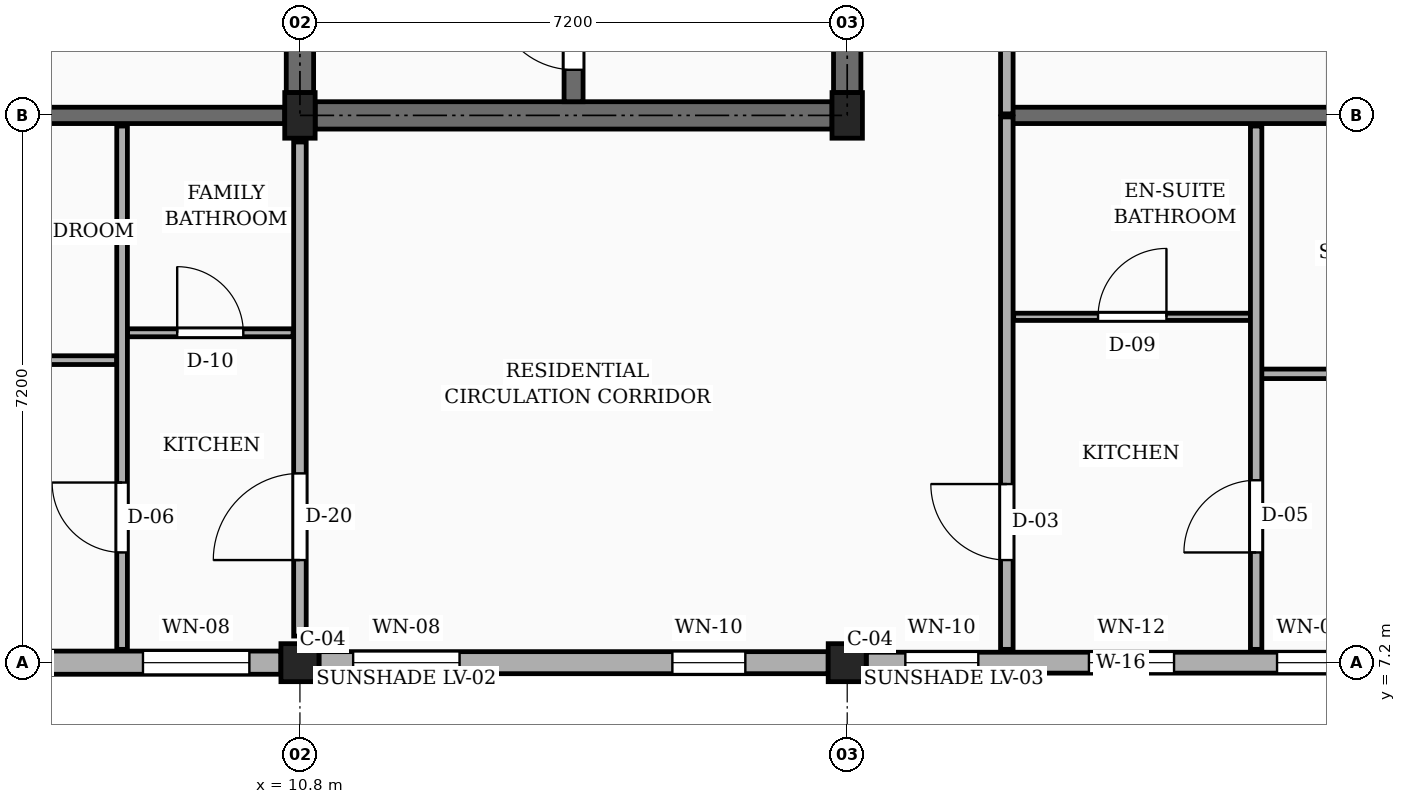
"""IFC4 building model, lengths in metres.
Left out: names, types, materials, properties, quantities, classifications, styles, units other than length and angle.
Written with IfcOpenShell. Run it as: python <this file> out.ifc"""

import sys

from ifc_helpers import new_model, si_unit, direction, frame, frame_2d, origin, origin_2d, place, context, subcontext, project, spatial, rectangle, extrude, element, fill, save


model = new_model("IFC4")
c1 = context("Model", 3, precision=1e-05, world=origin(), true_north=direction((0.0, 1.0)))
c2 = subcontext(c1, "Body", "Model", "MODEL_VIEW")
j1 = project(units=[si_unit("LENGTHUNIT", "METRE"), si_unit("PLANEANGLEUNIT", "RADIAN")], contexts=[c1])
p1 = place(None, origin())
s1 = spatial("IfcSite", under=j1, at=p1, CompositionType="ELEMENT")
p2 = place(p1, origin())
s2 = spatial("IfcBuilding", under=s1, at=p2, CompositionType="ELEMENT")
p3 = place(p2, frame((0.0, 0.0, 29.7)))
s3 = spatial("IfcBuildingStorey", under=s2, at=p3, CompositionType="ELEMENT", Elevation=29.7)
p4 = place(p3, frame((10.8, 7.2, 0.0), z_axis=(0.0, 0.0, 1.0), x_axis=(1.0, 0.0, 0.0)))
e1 = element("IfcColumn", 1, at=p4, inside=s3, PredefinedType="COLUMN", context=c2, shape_type="SweptSolid", body=[
    extrude(rectangle(XDim=0.5, YDim=0.5, at=origin_2d()), origin(), (0.0, 0.0, 1.0), 3.15),
])
p5 = place(p3, frame((10.8, 14.4, 0.0), z_axis=(0.0, 0.0, 1.0), x_axis=(1.0, 0.0, 0.0)))
e2 = element("IfcColumn", 2, at=p5, inside=s3, PredefinedType="COLUMN", context=c2, shape_type="SweptSolid", body=[
    extrude(rectangle(XDim=0.4, YDim=0.6, at=origin_2d()), origin(), (0.0, 0.0, 1.0), 3.15),
])
p6 = place(p3, frame((18.0, 7.2, 0.0), z_axis=(0.0, 0.0, 1.0), x_axis=(1.0, 0.0, 0.0)))
e3 = element("IfcColumn", 3, at=p6, inside=s3, PredefinedType="COLUMN", context=c2, shape_type="SweptSolid", body=[
    extrude(rectangle(XDim=0.5, YDim=0.5, at=origin_2d()), origin(), (0.0, 0.0, 1.0), 3.15),
])
p7 = place(p3, frame((18.0, 14.4, 0.0), z_axis=(0.0, 0.0, 1.0), x_axis=(1.0, 0.0, 0.0)))
e4 = element("IfcColumn", 4, at=p7, inside=s3, PredefinedType="COLUMN", context=c2, shape_type="SweptSolid", body=[
    extrude(rectangle(XDim=0.4, YDim=0.6, at=origin_2d()), origin(), (0.0, 0.0, 1.0), 3.15),
])
p8 = place(p3, frame((3.85, 14.4, 0.0), z_axis=(0.0, 0.0, 1.0), x_axis=(1.0, 0.0, 0.0)))
e5 = element("IfcWall", 5, at=p8, inside=s3, PredefinedType="SOLIDWALL", context=c2, shape_type="SweptSolid", body=[
    extrude(rectangle(XDim=6.75, YDim=0.215, at=frame_2d((3.375, 0.0))), origin(), (0.0, 0.0, 1.0), 2.17),
])
p9 = place(p8, frame((1.35, 0.0, 0.0)))
e6 = element("IfcOpeningElement", 6, at=p9, cuts=e5, PredefinedType="OPENING", context=c2, shape_type="SweptSolid", body=[
    extrude(rectangle(XDim=0.98, YDim=2.12, at=frame_2d((0.49, 1.06))), frame((0.0, 0.118, 0.0), z_axis=(0.0, -1.0, 0.0), x_axis=(1.0, 0.0, 0.0)), (0.0, 0.0, 1.0), 0.235),
])
p10 = place(p3, frame((20.1, 14.4, 0.0), z_axis=(0.0, 0.0, 1.0), x_axis=(1.0, 0.0, 0.0)))
e7 = element("IfcWall", 7, at=p10, inside=s3, PredefinedType="SOLIDWALL", context=c2, shape_type="SweptSolid", body=[
    extrude(rectangle(XDim=12.05, YDim=0.215, at=frame_2d((6.025, 0.0))), origin(), (0.0, 0.0, 1.0), 2.17),
])
p11 = place(p3, frame((3.85, 7.2, 0.0), z_axis=(0.0, 0.0, 1.0), x_axis=(1.0, 0.0, 0.0)))
e8 = element("IfcWall", 8, at=p11, inside=s3, PredefinedType="SOLIDWALL", context=c2, shape_type="SweptSolid", body=[
    extrude(rectangle(XDim=6.7, YDim=0.305, at=frame_2d((3.35, 0.0))), origin(), (0.0, 0.0, 1.0), 2.44),
])
p12 = place(p11, frame((1.755, 0.0, 0.78)))
e9 = element("IfcOpeningElement", 9, at=p12, cuts=e8, PredefinedType="OPENING", context=c2, shape_type="SweptSolid", body=[
    extrude(rectangle(XDim=1.24, YDim=1.15, at=frame_2d((0.62, 0.575))), frame((0.0, 0.163, 0.0), z_axis=(0.0, -1.0, 0.0), x_axis=(1.0, 0.0, 0.0)), (0.0, 0.0, 1.0), 0.325),
])
p13 = place(p11, frame((4.885, 0.0, 0.78)))
e10 = element("IfcOpeningElement", 10, at=p13, cuts=e8, PredefinedType="OPENING", context=c2, shape_type="SweptSolid", body=[
    extrude(rectangle(XDim=1.4, YDim=1.15, at=frame_2d((0.7, 0.575))), frame((0.0, 0.163, 0.0), z_axis=(0.0, -1.0, 0.0), x_axis=(1.0, 0.0, 0.0)), (0.0, 0.0, 1.0), 0.325),
])
p14 = place(p3, frame((11.05, 7.2, 0.0), z_axis=(0.0, 0.0, 1.0), x_axis=(1.0, 0.0, 0.0)))
e11 = element("IfcWall", 11, at=p14, inside=s3, PredefinedType="SOLIDWALL", context=c2, shape_type="SweptSolid", body=[
    extrude(rectangle(XDim=6.7, YDim=0.29, at=frame_2d((3.35, 0.0))), origin(), (0.0, 0.0, 1.0), 2.44),
])
p15 = place(p14, frame((0.45, 0.0, 0.78)))
e12 = element("IfcOpeningElement", 12, at=p15, cuts=e11, PredefinedType="OPENING", context=c2, shape_type="SweptSolid", body=[
    extrude(rectangle(XDim=1.4, YDim=1.15, at=frame_2d((0.7, 0.575))), frame((0.0, 0.155, 0.0), z_axis=(0.0, -1.0, 0.0), x_axis=(1.0, 0.0, 0.0)), (0.0, 0.0, 1.0), 0.31),
])
p16 = place(p14, frame((4.65, 0.0, 0.78)))
e13 = element("IfcOpeningElement", 13, at=p16, cuts=e11, PredefinedType="OPENING", context=c2, shape_type="SweptSolid", body=[
    extrude(rectangle(XDim=0.96, YDim=1.26, at=frame_2d((0.48, 0.63))), frame((0.0, 0.155, 0.0), z_axis=(0.0, -1.0, 0.0), x_axis=(1.0, 0.0, 0.0)), (0.0, 0.0, 1.0), 0.31),
])
p17 = place(p3, frame((18.25, 7.2, 0.0), z_axis=(0.0, 0.0, 1.0), x_axis=(1.0, 0.0, 0.0)))
e14 = element("IfcWall", 14, at=p17, inside=s3, PredefinedType="SOLIDWALL", context=c2, shape_type="SweptSolid", body=[
    extrude(rectangle(XDim=6.7, YDim=0.275, at=frame_2d((3.35, 0.0))), origin(), (0.0, 0.0, 1.0), 2.44),
])
p18 = place(p17, frame((0.515, 0.0, 0.78)))
e15 = element("IfcOpeningElement", 15, at=p18, cuts=e14, PredefinedType="OPENING", context=c2, shape_type="SweptSolid", body=[
    extrude(rectangle(XDim=0.96, YDim=1.26, at=frame_2d((0.48, 0.63))), frame((0.0, 0.147, 0.0), z_axis=(0.0, -1.0, 0.0), x_axis=(1.0, 0.0, 0.0)), (0.0, 0.0, 1.0), 0.295),
])
p19 = place(p17, frame((2.93, 0.0, 0.78)))
e16 = element("IfcOpeningElement", 16, at=p19, cuts=e14, PredefinedType="OPENING", context=c2, shape_type="SweptSolid", body=[
    extrude(rectangle(XDim=1.12, YDim=1.26, at=frame_2d((0.56, 0.63))), frame((0.0, 0.147, 0.0), z_axis=(0.0, -1.0, 0.0), x_axis=(1.0, 0.0, 0.0)), (0.0, 0.0, 1.0), 0.295),
])
p20 = place(p17, frame((5.405, 0.0, 0.78)))
e17 = element("IfcOpeningElement", 17, at=p20, cuts=e14, PredefinedType="OPENING", context=c2, shape_type="SweptSolid", body=[
    extrude(rectangle(XDim=0.88, YDim=1.26, at=frame_2d((0.44, 0.63))), frame((0.0, 0.147, 0.0), z_axis=(0.0, -1.0, 0.0), x_axis=(1.0, 0.0, 0.0)), (0.0, 0.0, 1.0), 0.295),
])
p21 = place(p3, frame((10.8, 14.7, 0.0), z_axis=(0.0, 0.0, 1.0), x_axis=(0.0, 1.0, 0.0)))
e18 = element("IfcWall", 18, at=p21, inside=s3, PredefinedType="SHEAR", context=c2, shape_type="SweptSolid", body=[
    extrude(rectangle(XDim=6.6, YDim=0.36, at=frame_2d((3.3, 0.0))), origin(), (0.0, 0.0, 1.0), 2.87),
])
p22 = place(p3, frame((18.0, 14.7, 0.0), z_axis=(0.0, 0.0, 1.0), x_axis=(0.0, 1.0, 0.0)))
e19 = element("IfcWall", 19, at=p22, inside=s3, PredefinedType="SHEAR", context=c2, shape_type="SweptSolid", body=[
    extrude(rectangle(XDim=6.6, YDim=0.36, at=frame_2d((3.3, 0.0))), origin(), (0.0, 0.0, 1.0), 2.87),
])
p23 = place(p22, frame((1.5, 0.0, 0.0)))
e20 = element("IfcOpeningElement", 20, at=p23, cuts=e19, PredefinedType="OPENING", context=c2, shape_type="SweptSolid", body=[
    extrude(rectangle(XDim=1.1, YDim=2.15, at=frame_2d((0.55, 1.075))), frame((0.0, 0.19, 0.0), z_axis=(0.0, -1.0, 0.0), x_axis=(1.0, 0.0, 0.0)), (0.0, 0.0, 1.0), 0.38),
])
p24 = place(p3, frame((11.0, 14.4, 0.0), z_axis=(0.0, 0.0, 1.0), x_axis=(1.0, 0.0, 0.0)))
e21 = element("IfcWall", 21, at=p24, inside=s3, PredefinedType="SHEAR", context=c2, shape_type="SweptSolid", body=[
    extrude(rectangle(XDim=6.8, YDim=0.36, at=frame_2d((3.4, 0.0))), origin(), (0.0, 0.0, 1.0), 2.87),
])
p25 = place(p3, frame((14.4, 14.58, 0.0), z_axis=(0.0, 0.0, 1.0), x_axis=(0.0, 1.0, 0.0)))
e22 = element("IfcWall", 22, at=p25, inside=s3, PredefinedType="SHEAR", context=c2, shape_type="SweptSolid", body=[
    extrude(rectangle(XDim=6.84, YDim=0.25, at=frame_2d((3.42, 0.0))), origin(), (0.0, 0.0, 1.0), 2.87),
])
p26 = place(p25, frame((0.42, 0.0, 0.0)))
e23 = element("IfcOpeningElement", 23, at=p26, cuts=e22, PredefinedType="OPENING", context=c2, shape_type="SweptSolid", body=[
    extrude(rectangle(XDim=1.05, YDim=2.15, at=frame_2d((0.525, 1.075))), frame((0.0, 0.135, 0.0), z_axis=(0.0, -1.0, 0.0), x_axis=(1.0, 0.0, 0.0)), (0.0, 0.0, 1.0), 0.27),
])
p27 = place(p3, frame((20.1, 7.375, 0.0), z_axis=(0.0, 0.0, 1.0), x_axis=(0.0, 1.0, 0.0)))
e24 = element("IfcWall", 24, at=p27, inside=s3, PredefinedType="PARTITIONING", context=c2, shape_type="SweptSolid", body=[
    extrude(rectangle(XDim=7.005, YDim=0.165, at=frame_2d((3.502, 0.0))), origin(), (0.0, 0.0, 1.0), 2.305),
])
p28 = place(p27, frame((1.175, 0.0, 0.0)))
e25 = element("IfcOpeningElement", 25, at=p28, cuts=e24, PredefinedType="OPENING", context=c2, shape_type="SweptSolid", body=[
    extrude(rectangle(XDim=1.0, YDim=2.15, at=frame_2d((0.5, 1.075))), frame((0.0, 0.093, 0.0), z_axis=(0.0, -1.0, 0.0), x_axis=(1.0, 0.0, 0.0)), (0.0, 0.0, 1.0), 0.185),
])
p29 = place(p3, frame((20.1, 14.42, 0.0), z_axis=(0.0, 0.0, 1.0), x_axis=(0.0, 1.0, 0.0)))
e26 = element("IfcWall", 26, at=p29, inside=s3, PredefinedType="PARTITIONING", context=c2, shape_type="SweptSolid", body=[
    extrude(rectangle(XDim=7.16, YDim=0.165, at=frame_2d((3.58, 0.0))), origin(), (0.0, 0.0, 1.0), 2.305),
])
p30 = place(p29, frame((4.78, 0.0, 0.0)))
e27 = element("IfcOpeningElement", 27, at=p30, cuts=e26, PredefinedType="OPENING", context=c2, shape_type="SweptSolid", body=[
    extrude(rectangle(XDim=0.94, YDim=2.12, at=frame_2d((0.47, 1.06))), frame((0.0, 0.093, 0.0), z_axis=(0.0, -1.0, 0.0), x_axis=(1.0, 0.0, 0.0)), (0.0, 0.0, 1.0), 0.185),
])
p31 = place(p3, frame((10.8, 7.55, 0.0), z_axis=(0.0, 0.0, 1.0), x_axis=(0.0, 1.0, 0.0)))
e28 = element("IfcWall", 28, at=p31, inside=s3, PredefinedType="PARTITIONING", context=c2, shape_type="SweptSolid", body=[
    extrude(rectangle(XDim=6.5, YDim=0.165, at=frame_2d((3.25, 0.0))), origin(), (0.0, 0.0, 1.0), 2.305),
])
p32 = place(p31, frame((1.0, 0.0, 0.0)))
e29 = element("IfcOpeningElement", 29, at=p32, cuts=e28, PredefinedType="OPENING", context=c2, shape_type="SweptSolid", body=[
    extrude(rectangle(XDim=1.14, YDim=2.18, at=frame_2d((0.57, 1.09))), frame((0.0, 0.093, 0.0), z_axis=(0.0, -1.0, 0.0), x_axis=(1.0, 0.0, 0.0)), (0.0, 0.0, 1.0), 0.185),
])
p33 = place(p3, frame((3.775, 11.18, 0.0), z_axis=(0.0, 0.0, 1.0), x_axis=(1.0, 0.0, 0.0)))
e30 = element("IfcWall", 30, at=p33, inside=s3, PredefinedType="PARTITIONING", context=c2, shape_type="SweptSolid", body=[
    extrude(rectangle(XDim=4.615, YDim=0.115, at=frame_2d((2.308, 0.0))), origin(), (0.0, 0.0, 1.0), 2.305),
])
p34 = place(p33, frame((1.867, 0.0, 0.0)))
e31 = element("IfcOpeningElement", 31, at=p34, cuts=e30, PredefinedType="OPENING", context=c2, shape_type="SweptSolid", body=[
    extrude(rectangle(XDim=0.88, YDim=2.08, at=frame_2d((0.44, 1.04))), frame((0.0, 0.067, 0.0), z_axis=(0.0, -1.0, 0.0), x_axis=(1.0, 0.0, 0.0)), (0.0, 0.0, 1.0), 0.135),
])
p35 = place(p3, frame((8.53, 11.54, 0.0), z_axis=(0.0, 0.0, 1.0), x_axis=(1.0, 0.0, 0.0)))
e32 = element("IfcWall", 32, at=p35, inside=s3, PredefinedType="PARTITIONING", context=c2, shape_type="SweptSolid", body=[
    extrude(rectangle(XDim=2.18, YDim=0.105, at=frame_2d((1.09, 0.0))), origin(), (0.0, 0.0, 1.0), 2.305),
])
p36 = place(p35, frame((0.655, 0.0, 0.0)))
e33 = element("IfcOpeningElement", 33, at=p36, cuts=e32, PredefinedType="OPENING", context=c2, shape_type="SweptSolid", body=[
    extrude(rectangle(XDim=0.87, YDim=2.05, at=frame_2d((0.435, 1.025))), frame((0.0, 0.062, 0.0), z_axis=(0.0, -1.0, 0.0), x_axis=(1.0, 0.0, 0.0)), (0.0, 0.0, 1.0), 0.125),
])
p37 = place(p3, frame((8.46, 7.375, 0.0), z_axis=(0.0, 0.0, 1.0), x_axis=(0.0, 1.0, 0.0)))
e34 = element("IfcWall", 34, at=p37, inside=s3, PredefinedType="PARTITIONING", context=c2, shape_type="SweptSolid", body=[
    extrude(rectangle(XDim=6.885, YDim=0.14, at=frame_2d((3.442, 0.0))), origin(), (0.0, 0.0, 1.0), 2.305),
])
p38 = place(p37, frame((1.275, 0.0, 0.0)))
e35 = element("IfcOpeningElement", 35, at=p38, cuts=e34, PredefinedType="OPENING", context=c2, shape_type="SweptSolid", body=[
    extrude(rectangle(XDim=0.92, YDim=2.1, at=frame_2d((0.46, 1.05))), frame((0.0, 0.08, 0.0), z_axis=(0.0, -1.0, 0.0), x_axis=(1.0, 0.0, 0.0)), (0.0, 0.0, 1.0), 0.16),
])
p39 = place(p3, frame((23.45, 11.0, 0.0), z_axis=(0.0, 0.0, 1.0), x_axis=(1.0, 0.0, 0.0)))
e36 = element("IfcWall", 36, at=p39, inside=s3, PredefinedType="PARTITIONING", context=c2, shape_type="SweptSolid", body=[
    extrude(rectangle(XDim=8.775, YDim=0.125, at=frame_2d((4.388, 0.0))), origin(), (0.0, 0.0, 1.0), 2.305),
])
p40 = place(p39, frame((3.938, 0.0, 0.0)))
e37 = element("IfcOpeningElement", 37, at=p40, cuts=e36, PredefinedType="OPENING", context=c2, shape_type="SweptSolid", body=[
    extrude(rectangle(XDim=0.9, YDim=2.1, at=frame_2d((0.45, 1.05))), frame((0.0, 0.073, 0.0), z_axis=(0.0, -1.0, 0.0), x_axis=(1.0, 0.0, 0.0)), (0.0, 0.0, 1.0), 0.145),
])
p41 = place(p3, frame((20.19, 11.75, 0.0), z_axis=(0.0, 0.0, 1.0), x_axis=(1.0, 0.0, 0.0)))
e38 = element("IfcWall", 38, at=p41, inside=s3, PredefinedType="PARTITIONING", context=c2, shape_type="SweptSolid", body=[
    extrude(rectangle(XDim=3.12, YDim=0.095, at=frame_2d((1.56, 0.0))), origin(), (0.0, 0.0, 1.0), 2.305),
])
p42 = place(p41, frame((1.11, 0.0, 0.0)))
e39 = element("IfcOpeningElement", 39, at=p42, cuts=e38, PredefinedType="OPENING", context=c2, shape_type="SweptSolid", body=[
    extrude(rectangle(XDim=0.9, YDim=2.05, at=frame_2d((0.45, 1.025))), frame((0.0, 0.058, 0.0), z_axis=(0.0, -1.0, 0.0), x_axis=(1.0, 0.0, 0.0)), (0.0, 0.0, 1.0), 0.115),
])
p43 = place(p3, frame((23.38, 7.375, 0.0), z_axis=(0.0, 0.0, 1.0), x_axis=(0.0, 1.0, 0.0)))
e40 = element("IfcWall", 40, at=p43, inside=s3, PredefinedType="PARTITIONING", context=c2, shape_type="SweptSolid", body=[
    extrude(rectangle(XDim=6.885, YDim=0.15, at=frame_2d((3.442, 0.0))), origin(), (0.0, 0.0, 1.0), 2.305),
])
p44 = place(p43, frame((1.275, 0.0, 0.0)))
e41 = element("IfcOpeningElement", 41, at=p44, cuts=e40, PredefinedType="OPENING", context=c2, shape_type="SweptSolid", body=[
    extrude(rectangle(XDim=0.95, YDim=2.1, at=frame_2d((0.475, 1.05))), frame((0.0, 0.085, 0.0), z_axis=(0.0, -1.0, 0.0), x_axis=(1.0, 0.0, 0.0)), (0.0, 0.0, 1.0), 0.17),
])
p45 = place(p13, origin())
e42 = element("IfcWindow", 42, at=p45, inside=s3, PartitioningType="SINGLE_PANEL", PredefinedType="WINDOW", context=c2, shape_type="SweptSolid", body=[
    extrude(rectangle(XDim=1.4, YDim=1.15, at=frame_2d((0.7, 0.575))), frame((0.0, 0.03, 0.0), z_axis=(0.0, -1.0, 0.0), x_axis=(1.0, 0.0, 0.0)), (0.0, 0.0, 1.0), 0.06),
])
fill(e10, e42)
p46 = place(p15, origin())
e43 = element("IfcWindow", 43, at=p46, inside=s3, PartitioningType="SINGLE_PANEL", PredefinedType="WINDOW", context=c2, shape_type="SweptSolid", body=[
    extrude(rectangle(XDim=1.4, YDim=1.15, at=frame_2d((0.7, 0.575))), frame((0.0, 0.03, 0.0), z_axis=(0.0, -1.0, 0.0), x_axis=(1.0, 0.0, 0.0)), (0.0, 0.0, 1.0), 0.06),
])
fill(e12, e43)
p47 = place(p16, origin())
e44 = element("IfcWindow", 44, at=p47, inside=s3, PartitioningType="SINGLE_PANEL", PredefinedType="WINDOW", context=c2, shape_type="SweptSolid", body=[
    extrude(rectangle(XDim=0.96, YDim=1.26, at=frame_2d((0.48, 0.63))), frame((0.0, 0.03, 0.0), z_axis=(0.0, -1.0, 0.0), x_axis=(1.0, 0.0, 0.0)), (0.0, 0.0, 1.0), 0.06),
])
fill(e13, e44)
p48 = place(p18, origin())
e45 = element("IfcWindow", 45, at=p48, inside=s3, PartitioningType="SINGLE_PANEL", PredefinedType="WINDOW", context=c2, shape_type="SweptSolid", body=[
    extrude(rectangle(XDim=0.96, YDim=1.26, at=frame_2d((0.48, 0.63))), frame((0.0, 0.03, 0.0), z_axis=(0.0, -1.0, 0.0), x_axis=(1.0, 0.0, 0.0)), (0.0, 0.0, 1.0), 0.06),
])
fill(e15, e45)
p49 = place(p19, origin())
e46 = element("IfcWindow", 46, at=p49, inside=s3, PartitioningType="SINGLE_PANEL", PredefinedType="WINDOW", context=c2, shape_type="SweptSolid", body=[
    extrude(rectangle(XDim=1.12, YDim=1.26, at=frame_2d((0.56, 0.63))), frame((0.0, 0.03, 0.0), z_axis=(0.0, -1.0, 0.0), x_axis=(1.0, 0.0, 0.0)), (0.0, 0.0, 1.0), 0.06),
])
fill(e16, e46)
p50 = place(p20, origin())
e47 = element("IfcWindow", 47, at=p50, inside=s3, PartitioningType="SINGLE_PANEL", PredefinedType="WINDOW", context=c2, shape_type="SweptSolid", body=[
    extrude(rectangle(XDim=0.88, YDim=1.26, at=frame_2d((0.44, 0.63))), frame((0.0, 0.03, 0.0), z_axis=(0.0, -1.0, 0.0), x_axis=(1.0, 0.0, 0.0)), (0.0, 0.0, 1.0), 0.06),
])
fill(e17, e47)
p51 = place(p26, origin())
e48 = element("IfcDoor", 48, at=p51, inside=s3, OperationType="SINGLE_SWING_RIGHT", PredefinedType="DOOR", context=c2, shape_type="SweptSolid", body=[
    extrude(rectangle(XDim=1.05, YDim=2.15, at=frame_2d((0.525, 1.075))), frame((0.0, 0.025, 0.0), z_axis=(0.0, -1.0, 0.0), x_axis=(1.0, 0.0, 0.0)), (0.0, 0.0, 1.0), 0.05),
])
fill(e23, e48)
p52 = place(p28, origin())
e49 = element("IfcDoor", 49, at=p52, inside=s3, OperationType="SINGLE_SWING_RIGHT", PredefinedType="DOOR", context=c2, shape_type="SweptSolid", body=[
    extrude(rectangle(XDim=1.0, YDim=2.15, at=frame_2d((0.5, 1.075))), frame((0.0, 0.025, 0.0), z_axis=(0.0, -1.0, 0.0), x_axis=(1.0, 0.0, 0.0)), (0.0, 0.0, 1.0), 0.05),
])
fill(e25, e49)
p53 = place(p32, origin())
e50 = element("IfcDoor", 50, at=p53, inside=s3, OperationType="SINGLE_SWING_LEFT", PredefinedType="DOOR", context=c2, shape_type="SweptSolid", body=[
    extrude(rectangle(XDim=1.14, YDim=2.18, at=frame_2d((0.57, 1.09))), frame((0.0, 0.025, 0.0), z_axis=(0.0, -1.0, 0.0), x_axis=(1.0, 0.0, 0.0)), (0.0, 0.0, 1.0), 0.05),
])
fill(e29, e50)
p54 = place(p36, origin())
e51 = element("IfcDoor", 51, at=p54, inside=s3, OperationType="SINGLE_SWING_LEFT", PredefinedType="DOOR", context=c2, shape_type="SweptSolid", body=[
    extrude(rectangle(XDim=0.87, YDim=2.05, at=frame_2d((0.435, 1.025))), frame((0.0, 0.025, 0.0), z_axis=(0.0, -1.0, 0.0), x_axis=(1.0, 0.0, 0.0)), (0.0, 0.0, 1.0), 0.05),
])
fill(e33, e51)
p55 = place(p38, origin())
e52 = element("IfcDoor", 52, at=p55, inside=s3, OperationType="SINGLE_SWING_RIGHT", PredefinedType="DOOR", context=c2, shape_type="SweptSolid", body=[
    extrude(rectangle(XDim=0.92, YDim=2.1, at=frame_2d((0.46, 1.05))), frame((0.0, 0.025, 0.0), z_axis=(0.0, -1.0, 0.0), x_axis=(1.0, 0.0, 0.0)), (0.0, 0.0, 1.0), 0.05),
])
fill(e35, e52)
p56 = place(p42, origin())
e53 = element("IfcDoor", 53, at=p56, inside=s3, OperationType="SINGLE_SWING_RIGHT", PredefinedType="DOOR", context=c2, shape_type="SweptSolid", body=[
    extrude(rectangle(XDim=0.9, YDim=2.05, at=frame_2d((0.45, 1.025))), frame((0.0, 0.025, 0.0), z_axis=(0.0, -1.0, 0.0), x_axis=(1.0, 0.0, 0.0)), (0.0, 0.0, 1.0), 0.05),
])
fill(e39, e53)
p57 = place(p44, origin())
e54 = element("IfcDoor", 54, at=p57, inside=s3, OperationType="SINGLE_SWING_LEFT", PredefinedType="DOOR", context=c2, shape_type="SweptSolid", body=[
    extrude(rectangle(XDim=0.95, YDim=2.1, at=frame_2d((0.475, 1.05))), frame((0.0, 0.025, 0.0), z_axis=(0.0, -1.0, 0.0), x_axis=(1.0, 0.0, 0.0)), (0.0, 0.0, 1.0), 0.05),
])
fill(e41, e54)
save(model, sys.argv[1])
